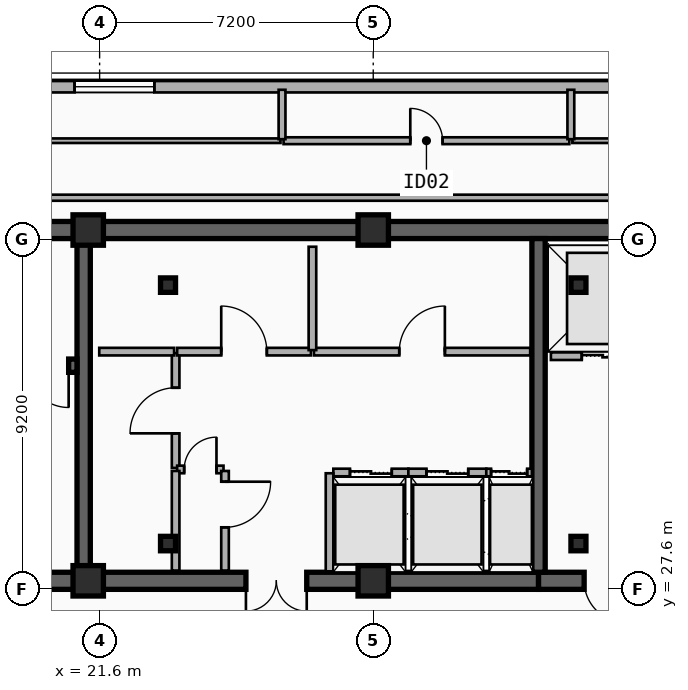
"""IFC4 building model, lengths in metres.
Left out: names, types, materials, properties, quantities, classifications, styles, units other than length and angle.
Written with IfcOpenShell. Run it as: python <this file> out.ifc"""

import sys

from ifc_helpers import new_model, si_unit, direction, frame, frame_2d, origin, origin_2d, place, context, subcontext, project, spatial, rectangle, i_section, extrude, element, fill, save


model = new_model("IFC4")
c1 = context("Model", 3, precision=1e-05, world=origin(), true_north=direction((0.0, 1.0)))
c2 = subcontext(c1, "Body", "Model", "MODEL_VIEW")
j1 = project(units=[si_unit("LENGTHUNIT", "METRE"), si_unit("PLANEANGLEUNIT", "RADIAN")], contexts=[c1])
p1 = place(None, origin())
s1 = spatial("IfcSite", under=j1, at=p1, CompositionType="ELEMENT")
p2 = place(p1, origin())
s2 = spatial("IfcBuilding", under=s1, at=p2, CompositionType="ELEMENT")
p3 = place(p2, frame((0.0, 0.0, 251.0)))
s3 = spatial("IfcBuildingStorey", under=s2, at=p3, CompositionType="ELEMENT", Elevation=251.0)
p4 = place(p3, frame((12.15, 37.05, 0.0), z_axis=(0.0, 0.0, 1.0), x_axis=(1.0, 0.0, 0.0)))
e1 = element("IfcWall", 1, at=p4, inside=s3, PredefinedType="SHEAR", context=c2, shape_type="SweptSolid", body=[
    extrude(rectangle(XDim=33.23, YDim=0.45, at=frame_2d((16.615, 0.0))), origin(), (0.0, 0.0, 1.0), 3.7),
])
p5 = place(p3, frame((21.18, 27.82, 0.0), z_axis=(0.0, 0.0, 1.0), x_axis=(-1.0, 0.0, 0.0)))
e2 = element("IfcWall", 2, at=p5, inside=s3, PredefinedType="SHEAR", context=c2, shape_type="SweptSolid", body=[
    extrude(rectangle(XDim=9.03, YDim=0.45, at=frame_2d((4.515, 0.0))), origin(), (0.0, 0.0, 1.0), 3.7),
])
p6 = place(p5, frame((2.68, 0.0, 0.0)))
e3 = element("IfcOpeningElement", 3, at=p6, cuts=e2, PredefinedType="OPENING", context=c2, shape_type="SweptSolid", body=[
    extrude(rectangle(XDim=1.1, YDim=2.15, at=frame_2d((0.55, 1.075))), frame((0.0, 0.235, 0.0), z_axis=(0.0, -1.0, 0.0), x_axis=(1.0, 0.0, 0.0)), (0.0, 0.0, 1.0), 0.47),
])
p7 = place(p3, frame((33.15, 27.82, 0.0), z_axis=(0.0, 0.0, 1.0), x_axis=(-1.0, 0.0, 0.0)))
e4 = element("IfcWall", 4, at=p7, inside=s3, PredefinedType="SHEAR", context=c2, shape_type="SweptSolid", body=[
    extrude(rectangle(XDim=11.97, YDim=0.45, at=frame_2d((5.985, 0.0))), origin(), (0.0, 0.0, 1.0), 3.7),
])
p8 = place(p7, frame((6.1, 0.0, 0.0)))
e5 = element("IfcOpeningElement", 5, at=p8, cuts=e4, PredefinedType="OPENING", context=c2, shape_type="SweptSolid", body=[
    extrude(rectangle(XDim=1.6, YDim=2.2, at=frame_2d((0.8, 1.1))), frame((0.0, 0.235, 0.0), z_axis=(0.0, -1.0, 0.0), x_axis=(1.0, 0.0, 0.0)), (0.0, 0.0, 1.0), 0.47),
])
p9 = place(p3, frame((45.38, 27.82, 0.0), z_axis=(0.0, 0.0, 1.0), x_axis=(-1.0, 0.0, 0.0)))
e6 = element("IfcWall", 6, at=p9, inside=s3, PredefinedType="SHEAR", context=c2, shape_type="SweptSolid", body=[
    extrude(rectangle(XDim=12.23, YDim=0.45, at=frame_2d((6.115, 0.0))), origin(), (0.0, 0.0, 1.0), 3.7),
])
p10 = place(p9, frame((9.93, 0.0, 0.0)))
e7 = element("IfcOpeningElement", 7, at=p10, cuts=e6, PredefinedType="OPENING", context=c2, shape_type="SweptSolid", body=[
    extrude(rectangle(XDim=1.1, YDim=2.15, at=frame_2d((0.55, 1.075))), frame((0.0, 0.235, 0.0), z_axis=(0.0, -1.0, 0.0), x_axis=(1.0, 0.0, 0.0)), (0.0, 0.0, 1.0), 0.47),
])
p11 = place(p9, frame((6.23, 0.0, 0.0)))
e8 = element("IfcOpeningElement", 8, at=p11, cuts=e6, PredefinedType="OPENING", context=c2, shape_type="SweptSolid", body=[
    extrude(rectangle(XDim=1.1, YDim=2.15, at=frame_2d((0.55, 1.075))), frame((0.0, 0.235, 0.0), z_axis=(0.0, -1.0, 0.0), x_axis=(1.0, 0.0, 0.0)), (0.0, 0.0, 1.0), 0.47),
])
for number, where, z_axis, x_axis in (
    (9, (21.18, 28.045, 0.0), (0.0, 0.0, 1.0), (0.0, 1.0, 0.0)),
    (10, (33.15, 28.045, 0.0), (0.0, 0.0, 1.0), (0.0, 1.0, 0.0)),
):
    element("IfcWall", number, at=place(p3, frame(where, z_axis=z_axis, x_axis=x_axis)), inside=s3, PredefinedType="SHEAR", context=c2, shape_type="SweptSolid", body=[
        extrude(rectangle(XDim=8.78, YDim=0.35, at=frame_2d((4.39, 0.0))), origin(), (0.0, 0.0, 1.0), 3.7),
    ])
p12 = place(p3, frame((21.005, 33.48, 0.0), z_axis=(0.0, 0.0, 1.0), x_axis=(-1.0, 0.0, 0.0)))
e11 = element("IfcWall", 11, at=p12, inside=s3, PredefinedType="SHEAR", context=c2, shape_type="SweptSolid", body=[
    extrude(rectangle(XDim=8.63, YDim=0.35, at=frame_2d((4.315, 0.0))), origin(), (0.0, 0.0, 1.0), 3.7),
])
p13 = place(p12, frame((0.22, 0.0, 0.0)))
e12 = element("IfcOpeningElement", 12, at=p13, cuts=e11, PredefinedType="OPENING", context=c2, shape_type="SweptSolid", body=[
    extrude(rectangle(XDim=1.1, YDim=2.15, at=frame_2d((0.55, 1.075))), frame((0.0, 0.185, 0.0), z_axis=(0.0, -1.0, 0.0), x_axis=(1.0, 0.0, 0.0)), (0.0, 0.0, 1.0), 0.37),
])
for number, where, z_axis, x_axis in (
    (13, (23.4, 28.8, 0.0), (0.0, 0.0, 1.0), (1.0, 0.0, 0.0)),
    (14, (34.2, 28.8, 0.0), (0.0, 0.0, 1.0), (1.0, 0.0, 0.0)),
    (15, (34.2, 35.6, 0.0), (0.0, 0.0, 1.0), (1.0, 0.0, 0.0)),
    (16, (23.4, 35.6, 0.0), (0.0, 0.0, 1.0), (1.0, 0.0, 0.0)),
):
    element("IfcColumn", number, at=place(p3, frame(where, z_axis=z_axis, x_axis=x_axis)), inside=s3, PredefinedType="COLUMN", context=c2, shape_type="SweptSolid", body=[
        extrude(i_section(OverallWidth=0.395, OverallDepth=0.38, WebThickness=0.019, FlangeThickness=0.03, FilletRadius=0.015, at=origin_2d()), origin(), (0.0, 0.0, 1.0), 3.7),
    ])
for number, where, z_axis, x_axis in (
    (17, (21.3, 27.82, 0.0), (0.0, 0.0, 1.0), (1.0, 0.0, 0.0)),
    (18, (21.3, 37.05, 0.0), (0.0, 0.0, 1.0), (1.0, 0.0, 0.0)),
    (19, (28.8, 27.82, 0.0), (0.0, 0.0, 1.0), (1.0, 0.0, 0.0)),
    (20, (28.8, 37.05, 0.0), (0.0, 0.0, 1.0), (1.0, 0.0, 0.0)),
):
    element("IfcColumn", number, at=place(p3, frame(where, z_axis=z_axis, x_axis=x_axis)), inside=s3, PredefinedType="COLUMN", context=c2, shape_type="SweptSolid", body=[
        extrude(rectangle(XDim=0.8, YDim=0.8, at=origin_2d()), origin(), (0.0, 0.0, 1.0), 3.7),
    ])
p14 = place(p3, frame((12.4, 40.82, 0.0), z_axis=(0.0, 0.0, 1.0), x_axis=(1.0, 0.0, 0.0)))
e21 = element("IfcWall", 21, at=p14, inside=s3, PredefinedType="SOLIDWALL", context=c2, shape_type="SweptSolid", body=[
    extrude(rectangle(XDim=32.8, YDim=0.3, at=frame_2d((16.4, 0.0))), origin(), (0.0, 0.0, 1.0), 3.42),
])
p15 = place(p14, frame((3.38, 0.0, 0.75)))
e22 = element("IfcOpeningElement", 22, at=p15, cuts=e21, PredefinedType="OPENING", context=c2, shape_type="SweptSolid", body=[
    extrude(rectangle(XDim=2.1, YDim=2.1, at=frame_2d((1.05, 1.05))), frame((0.0, 0.16, 0.0), z_axis=(0.0, -1.0, 0.0), x_axis=(1.0, 0.0, 0.0)), (0.0, 0.0, 1.0), 0.32),
])
p16 = place(p14, frame((8.54, 0.0, 0.75)))
e23 = element("IfcOpeningElement", 23, at=p16, cuts=e21, PredefinedType="OPENING", context=c2, shape_type="SweptSolid", body=[
    extrude(rectangle(XDim=2.1, YDim=2.1, at=frame_2d((1.05, 1.05))), frame((0.0, 0.16, 0.0), z_axis=(0.0, -1.0, 0.0), x_axis=(1.0, 0.0, 0.0)), (0.0, 0.0, 1.0), 0.32),
])
p17 = place(p3, frame((33.475, 33.73, 0.0), z_axis=(0.0, 0.0, 1.0), x_axis=(1.0, 0.0, 0.0)))
e24 = element("IfcWall", 24, at=p17, inside=s3, PredefinedType="PARTITIONING", context=c2, shape_type="SweptSolid", body=[
    extrude(rectangle(XDim=2.725, YDim=0.2, at=frame_2d((1.362, 0.0))), origin(), (0.0, 0.0, 1.0), 2.49),
])
p18 = place(p17, frame((0.812, 0.0, 0.0)))
e25 = element("IfcOpeningElement", 25, at=p18, cuts=e24, PredefinedType="OPENING", context=c2, shape_type="SweptSolid", body=[
    extrude(rectangle(XDim=1.1, YDim=2.15, at=frame_2d((0.55, 1.075))), frame((0.0, 0.11, 0.0), z_axis=(0.0, -1.0, 0.0), x_axis=(1.0, 0.0, 0.0)), (0.0, 0.0, 1.0), 0.22),
])
p19 = place(p3, frame((27.75, 30.67, 0.0), z_axis=(0.0, 0.0, 1.0), x_axis=(1.0, 0.0, 0.0)))
e26 = element("IfcWall", 26, at=p19, inside=s3, PredefinedType="PARTITIONING", context=c2, shape_type="SweptSolid", body=[
    extrude(rectangle(XDim=1.975, YDim=0.2, at=frame_2d((0.988, 0.0))), origin(), (0.0, 0.0, 1.0), 2.49),
])
p20 = place(p19, frame((0.438, 0.0, 0.0)))
e27 = element("IfcOpeningElement", 27, at=p20, cuts=e26, PredefinedType="OPENING", context=c2, shape_type="SweptSolid", body=[
    extrude(rectangle(XDim=1.1, YDim=2.15, at=frame_2d((0.55, 1.075))), frame((0.0, 0.11, 0.0), z_axis=(0.0, -1.0, 0.0), x_axis=(1.0, 0.0, 0.0)), (0.0, 0.0, 1.0), 0.22),
])
p21 = place(p3, frame((27.65, 28.07, 0.0), z_axis=(0.0, 0.0, 1.0), x_axis=(0.0, 1.0, 0.0)))
e28 = element("IfcWall", 28, at=p21, inside=s3, PredefinedType="PARTITIONING", context=c2, shape_type="SweptSolid", body=[
    extrude(rectangle(XDim=2.58, YDim=0.2, at=frame_2d((1.29, 0.0))), origin(), (0.0, 0.0, 1.0), 2.49),
])
p22 = place(p3, frame((29.725, 30.67, 0.0), z_axis=(0.0, 0.0, 1.0), x_axis=(1.0, 0.0, 0.0)))
e29 = element("IfcWall", 29, at=p22, inside=s3, PredefinedType="PARTITIONING", context=c2, shape_type="SweptSolid", body=[
    extrude(rectangle(XDim=2.05, YDim=0.2, at=frame_2d((1.025, 0.0))), origin(), (0.0, 0.0, 1.0), 2.8),
])
p23 = place(p22, frame((0.475, 0.0, 0.0)))
e30 = element("IfcOpeningElement", 30, at=p23, cuts=e29, PredefinedType="OPENING", context=c2, shape_type="SweptSolid", body=[
    extrude(rectangle(XDim=1.1, YDim=2.15, at=frame_2d((0.55, 1.075))), frame((0.0, 0.11, 0.0), z_axis=(0.0, -1.0, 0.0), x_axis=(1.0, 0.0, 0.0)), (0.0, 0.0, 1.0), 0.22),
])
p24 = place(p3, frame((31.775, 30.67, 0.0), z_axis=(0.0, 0.0, 1.0), x_axis=(1.0, 0.0, 0.0)))
e31 = element("IfcWall", 31, at=p24, inside=s3, PredefinedType="PARTITIONING", context=c2, shape_type="SweptSolid", body=[
    extrude(rectangle(XDim=1.2, YDim=0.2, at=frame_2d((0.6, 0.0))), origin(), (0.0, 0.0, 1.0), 2.8),
])
p25 = place(p24, frame((0.125, 0.0, 0.0)))
e32 = element("IfcOpeningElement", 32, at=p25, cuts=e31, PredefinedType="OPENING", context=c2, shape_type="SweptSolid", body=[
    extrude(rectangle(XDim=0.95, YDim=2.15, at=frame_2d((0.475, 1.075))), frame((0.0, 0.11, 0.0), z_axis=(0.0, -1.0, 0.0), x_axis=(1.0, 0.0, 0.0)), (0.0, 0.0, 1.0), 0.22),
])
p26 = place(p3, frame((23.6, 30.79, 0.0), z_axis=(0.0, 0.0, 1.0), x_axis=(0.0, 1.0, 0.0)))
e33 = element("IfcWall", 33, at=p26, inside=s3, PredefinedType="PARTITIONING", context=c2, shape_type="SweptSolid", body=[
    extrude(rectangle(XDim=3.02, YDim=0.2, at=frame_2d((1.51, 0.0))), origin(), (0.0, 0.0, 1.0), 3.42),
])
p27 = place(p26, frame((0.91, 0.0, 0.0)))
e34 = element("IfcOpeningElement", 34, at=p27, cuts=e33, PredefinedType="OPENING", context=c2, shape_type="SweptSolid", body=[
    extrude(rectangle(XDim=1.2, YDim=2.15, at=frame_2d((0.6, 1.075))), frame((0.0, 0.11, 0.0), z_axis=(0.0, -1.0, 0.0), x_axis=(1.0, 0.0, 0.0)), (0.0, 0.0, 1.0), 0.22),
])
p28 = place(p3, frame((23.64, 30.75, 0.0), z_axis=(0.0, 0.0, 1.0), x_axis=(1.0, 0.0, 0.0)))
e35 = element("IfcWall", 35, at=p28, inside=s3, PredefinedType="PARTITIONING", context=c2, shape_type="SweptSolid", body=[
    extrude(rectangle(XDim=1.22, YDim=0.2, at=frame_2d((0.61, 0.0))), origin(), (0.0, 0.0, 1.0), 3.42),
])
p29 = place(p28, frame((0.185, 0.0, 0.0)))
e36 = element("IfcOpeningElement", 36, at=p29, cuts=e35, PredefinedType="OPENING", context=c2, shape_type="SweptSolid", body=[
    extrude(rectangle(XDim=0.85, YDim=2.1, at=frame_2d((0.425, 1.05))), frame((0.0, 0.11, 0.0), z_axis=(0.0, -1.0, 0.0), x_axis=(1.0, 0.0, 0.0)), (0.0, 0.0, 1.0), 0.22),
])
p30 = place(p3, frame((23.64, 33.85, 0.0), z_axis=(0.0, 0.0, 1.0), x_axis=(1.0, 0.0, 0.0)))
e37 = element("IfcWall", 37, at=p30, inside=s3, PredefinedType="PARTITIONING", context=c2, shape_type="SweptSolid", body=[
    extrude(rectangle(XDim=3.52, YDim=0.2, at=frame_2d((1.76, 0.0))), origin(), (0.0, 0.0, 1.0), 3.42),
])
p31 = place(p30, frame((1.16, 0.0, 0.0)))
e38 = element("IfcOpeningElement", 38, at=p31, cuts=e37, PredefinedType="OPENING", context=c2, shape_type="SweptSolid", body=[
    extrude(rectangle(XDim=1.2, YDim=2.15, at=frame_2d((0.6, 1.075))), frame((0.0, 0.11, 0.0), z_axis=(0.0, -1.0, 0.0), x_axis=(1.0, 0.0, 0.0)), (0.0, 0.0, 1.0), 0.22),
])
p32 = place(p3, frame((27.24, 33.85, 0.0), z_axis=(0.0, 0.0, 1.0), x_axis=(1.0, 0.0, 0.0)))
e39 = element("IfcWall", 39, at=p32, inside=s3, PredefinedType="PARTITIONING", context=c2, shape_type="SweptSolid", body=[
    extrude(rectangle(XDim=5.69, YDim=0.2, at=frame_2d((2.845, 0.0))), origin(), (0.0, 0.0, 1.0), 2.49),
])
p33 = place(p32, frame((2.245, 0.0, 0.0)))
e40 = element("IfcOpeningElement", 40, at=p33, cuts=e39, PredefinedType="OPENING", context=c2, shape_type="SweptSolid", body=[
    extrude(rectangle(XDim=1.2, YDim=2.15, at=frame_2d((0.6, 1.075))), frame((0.0, 0.11, 0.0), z_axis=(0.0, -1.0, 0.0), x_axis=(1.0, 0.0, 0.0)), (0.0, 0.0, 1.0), 0.22),
])
p34 = place(p3, frame((24.9, 30.71, 0.0), z_axis=(0.0, 0.0, 1.0), x_axis=(0.0, -1.0, 0.0)))
e41 = element("IfcWall", 41, at=p34, inside=s3, PredefinedType="PARTITIONING", context=c2, shape_type="SweptSolid", body=[
    extrude(rectangle(XDim=2.62, YDim=0.2, at=frame_2d((1.31, 0.0))), origin(), (0.0, 0.0, 1.0), 2.8),
])
p35 = place(p34, frame((0.282, 0.0, 0.0)))
e42 = element("IfcOpeningElement", 42, at=p35, cuts=e41, PredefinedType="OPENING", context=c2, shape_type="SweptSolid", body=[
    extrude(rectangle(XDim=1.2, YDim=2.15, at=frame_2d((0.6, 1.075))), frame((0.0, 0.11, 0.0), z_axis=(0.0, -1.0, 0.0), x_axis=(1.0, 0.0, 0.0)), (0.0, 0.0, 1.0), 0.22),
])
p36 = place(p3, frame((23.6, 28.09, 0.0), z_axis=(0.0, 0.0, 1.0), x_axis=(0.0, 1.0, 0.0)))
e43 = element("IfcWall", 43, at=p36, inside=s3, PredefinedType="PARTITIONING", context=c2, shape_type="SweptSolid", body=[
    extrude(rectangle(XDim=2.62, YDim=0.2, at=frame_2d((1.31, 0.0))), origin(), (0.0, 0.0, 1.0), 2.8),
])
p37 = place(p3, frame((21.59, 33.85, 0.0), z_axis=(0.0, 0.0, 1.0), x_axis=(1.0, 0.0, 0.0)))
e44 = element("IfcWall", 44, at=p37, inside=s3, PredefinedType="PARTITIONING", context=c2, shape_type="SweptSolid", body=[
    extrude(rectangle(XDim=1.97, YDim=0.2, at=frame_2d((0.985, 0.0))), origin(), (0.0, 0.0, 1.0), 2.49),
])
p38 = place(p3, frame((27.2, 33.89, 0.0), z_axis=(0.0, 0.0, 1.0), x_axis=(0.0, 1.0, 0.0)))
e45 = element("IfcWall", 45, at=p38, inside=s3, PredefinedType="PARTITIONING", context=c2, shape_type="SweptSolid", body=[
    extrude(rectangle(XDim=2.72, YDim=0.2, at=frame_2d((1.36, 0.0))), origin(), (0.0, 0.0, 1.0), 3.42),
])
p39 = place(p3, frame((8.46, 39.4, 0.0), z_axis=(0.0, 0.0, 1.0), x_axis=(1.0, 0.0, 0.0)))
e46 = element("IfcWall", 46, at=p39, inside=s3, PredefinedType="PARTITIONING", context=c2, shape_type="SweptSolid", body=[
    extrude(rectangle(XDim=17.9, YDim=0.12, at=frame_2d((8.95, 0.0))), origin(), (0.0, 0.0, 1.0), 3.42),
])
p40 = place(p39, frame((8.5, 0.0, 0.0)))
e47 = element("IfcOpeningElement", 47, at=p40, cuts=e46, PredefinedType="OPENING", context=c2, shape_type="SweptSolid", body=[
    extrude(rectangle(XDim=0.9, YDim=2.1, at=frame_2d((0.45, 1.05))), frame((0.0, 0.07, 0.0), z_axis=(0.0, -1.0, 0.0), x_axis=(1.0, 0.0, 0.0)), (0.0, 0.0, 1.0), 0.14),
])
p41 = place(p3, frame((26.44, 39.4, 0.0), z_axis=(0.0, 0.0, 1.0), x_axis=(1.0, 0.0, 0.0)))
e48 = element("IfcWall", 48, at=p41, inside=s3, PredefinedType="PLUMBINGWALL", context=c2, shape_type="SweptSolid", body=[
    extrude(rectangle(XDim=7.52, YDim=0.18, at=frame_2d((3.76, 0.0))), origin(), (0.0, 0.0, 1.0), 3.42),
])
p42 = place(p41, frame((3.335, 0.0, 0.0)))
e49 = element("IfcOpeningElement", 49, at=p42, cuts=e48, PredefinedType="OPENING", context=c2, shape_type="SweptSolid", body=[
    extrude(rectangle(XDim=0.85, YDim=2.1, at=frame_2d((0.425, 1.05))), frame((0.0, 0.1, 0.0), z_axis=(0.0, -1.0, 0.0), x_axis=(1.0, 0.0, 0.0)), (0.0, 0.0, 1.0), 0.2),
])
p43 = place(p3, frame((34.04, 39.4, 0.0), z_axis=(0.0, 0.0, 1.0), x_axis=(1.0, 0.0, 0.0)))
e50 = element("IfcWall", 50, at=p43, inside=s3, PredefinedType="PARTITIONING", context=c2, shape_type="SweptSolid", body=[
    extrude(rectangle(XDim=15.1, YDim=0.12, at=frame_2d((7.55, 0.0))), origin(), (0.0, 0.0, 1.0), 3.42),
])
p44 = place(p43, frame((7.1, 0.0, 0.0)))
e51 = element("IfcOpeningElement", 51, at=p44, cuts=e50, PredefinedType="OPENING", context=c2, shape_type="SweptSolid", body=[
    extrude(rectangle(XDim=0.9, YDim=2.1, at=frame_2d((0.45, 1.05))), frame((0.0, 0.07, 0.0), z_axis=(0.0, -1.0, 0.0), x_axis=(1.0, 0.0, 0.0)), (0.0, 0.0, 1.0), 0.14),
])
for number, where, z_axis, x_axis in (
    (52, (26.4, 39.44, 0.0), (0.0, 0.0, 1.0), (0.0, 1.0, 0.0)),
    (53, (34.0, 39.44, 0.0), (0.0, 0.0, 1.0), (0.0, 1.0, 0.0)),
):
    element("IfcWall", number, at=place(p3, frame(where, z_axis=z_axis, x_axis=x_axis)), inside=s3, PredefinedType="PLUMBINGWALL", context=c2, shape_type="SweptSolid", body=[
        extrude(rectangle(XDim=1.3, YDim=0.18, at=frame_2d((0.65, 0.0))), origin(), (0.0, 0.0, 1.0), 3.42),
    ])
p45 = place(p3, frame((11.28, 37.9, 0.0), z_axis=(0.0, 0.0, 1.0), x_axis=(1.0, 0.0, 0.0)))
e54 = element("IfcWall", 54, at=p45, inside=s3, PredefinedType="PARTITIONING", context=c2, shape_type="SweptSolid", body=[
    extrude(rectangle(XDim=35.04, YDim=0.16, at=frame_2d((17.52, 0.0))), origin(), (0.0, 0.0, 1.0), 3.42),
])
p46 = place(p16, origin())
e55 = element("IfcWindow", 55, at=p46, inside=s3, PartitioningType="SINGLE_PANEL", PredefinedType="WINDOW", context=c2, shape_type="SweptSolid", body=[
    extrude(rectangle(XDim=2.1, YDim=2.1, at=frame_2d((1.05, 1.05))), frame((0.0, 0.03, 0.0), z_axis=(0.0, -1.0, 0.0), x_axis=(1.0, 0.0, 0.0)), (0.0, 0.0, 1.0), 0.06),
])
fill(e23, e55)
p47 = place(p18, origin())
e56 = element("IfcDoor", 56, at=p47, inside=s3, OperationType="DOUBLE_DOOR_SLIDING", PredefinedType="DOOR", context=c2, shape_type="SweptSolid", body=[
    extrude(rectangle(XDim=1.1, YDim=2.15, at=frame_2d((0.55, 1.075))), frame((0.0, 0.025, 0.0), z_axis=(0.0, -1.0, 0.0), x_axis=(1.0, 0.0, 0.0)), (0.0, 0.0, 1.0), 0.05),
])
fill(e25, e56)
p48 = place(p20, origin())
e57 = element("IfcDoor", 57, at=p48, inside=s3, OperationType="DOUBLE_DOOR_SLIDING", PredefinedType="DOOR", context=c2, shape_type="SweptSolid", body=[
    extrude(rectangle(XDim=1.1, YDim=2.15, at=frame_2d((0.55, 1.075))), frame((0.0, 0.025, 0.0), z_axis=(0.0, -1.0, 0.0), x_axis=(1.0, 0.0, 0.0)), (0.0, 0.0, 1.0), 0.05),
])
fill(e27, e57)
p49 = place(p23, origin())
e58 = element("IfcDoor", 58, at=p49, inside=s3, OperationType="DOUBLE_DOOR_SLIDING", PredefinedType="DOOR", context=c2, shape_type="SweptSolid", body=[
    extrude(rectangle(XDim=1.1, YDim=2.15, at=frame_2d((0.55, 1.075))), frame((0.0, 0.025, 0.0), z_axis=(0.0, -1.0, 0.0), x_axis=(1.0, 0.0, 0.0)), (0.0, 0.0, 1.0), 0.05),
])
fill(e30, e58)
p50 = place(p25, origin())
e59 = element("IfcDoor", 59, at=p50, inside=s3, OperationType="DOUBLE_DOOR_SLIDING", PredefinedType="DOOR", context=c2, shape_type="SweptSolid", body=[
    extrude(rectangle(XDim=0.95, YDim=2.15, at=frame_2d((0.475, 1.075))), frame((0.0, 0.025, 0.0), z_axis=(0.0, -1.0, 0.0), x_axis=(1.0, 0.0, 0.0)), (0.0, 0.0, 1.0), 0.05),
])
fill(e32, e59)
p51 = place(p13, origin())
e60 = element("IfcDoor", 60, at=p51, inside=s3, OperationType="SINGLE_SWING_LEFT", PredefinedType="DOOR", context=c2, shape_type="SweptSolid", body=[
    extrude(rectangle(XDim=1.1, YDim=2.15, at=frame_2d((0.55, 1.075))), frame((0.0, 0.025, 0.0), z_axis=(0.0, -1.0, 0.0), x_axis=(1.0, 0.0, 0.0)), (0.0, 0.0, 1.0), 0.05),
])
fill(e12, e60)
p52 = place(p10, origin())
e61 = element("IfcDoor", 61, at=p52, inside=s3, OperationType="SINGLE_SWING_LEFT", PredefinedType="DOOR", context=c2, shape_type="SweptSolid", body=[
    extrude(rectangle(XDim=1.1, YDim=2.15, at=frame_2d((0.55, 1.075))), frame((0.0, 0.025, 0.0), z_axis=(0.0, -1.0, 0.0), x_axis=(1.0, 0.0, 0.0)), (0.0, 0.0, 1.0), 0.05),
])
fill(e7, e61)
p53 = place(p8, origin())
e62 = element("IfcDoor", 62, at=p53, inside=s3, OperationType="SINGLE_SWING_LEFT", PredefinedType="DOOR", context=c2, shape_type="SweptSolid", body=[
    extrude(rectangle(XDim=1.6, YDim=2.2, at=frame_2d((0.8, 1.1))), frame((0.0, 0.025, 0.0), z_axis=(0.0, -1.0, 0.0), x_axis=(1.0, 0.0, 0.0)), (0.0, 0.0, 1.0), 0.05),
])
fill(e5, e62)
p54 = place(p27, origin())
e63 = element("IfcDoor", 63, at=p54, inside=s3, OperationType="SINGLE_SWING_LEFT", PredefinedType="DOOR", context=c2, shape_type="SweptSolid", body=[
    extrude(rectangle(XDim=1.2, YDim=2.15, at=frame_2d((0.6, 1.075))), frame((0.0, 0.025, 0.0), z_axis=(0.0, -1.0, 0.0), x_axis=(1.0, 0.0, 0.0)), (0.0, 0.0, 1.0), 0.05),
])
fill(e34, e63)
p55 = place(p29, origin())
e64 = element("IfcDoor", 64, at=p55, inside=s3, OperationType="SINGLE_SWING_RIGHT", PredefinedType="DOOR", context=c2, shape_type="SweptSolid", body=[
    extrude(rectangle(XDim=0.85, YDim=2.1, at=frame_2d((0.425, 1.05))), frame((0.0, 0.025, 0.0), z_axis=(0.0, -1.0, 0.0), x_axis=(1.0, 0.0, 0.0)), (0.0, 0.0, 1.0), 0.05),
])
fill(e36, e64)
p56 = place(p31, origin())
e65 = element("IfcDoor", 65, at=p56, inside=s3, OperationType="SINGLE_SWING_LEFT", PredefinedType="DOOR", context=c2, shape_type="SweptSolid", body=[
    extrude(rectangle(XDim=1.2, YDim=2.15, at=frame_2d((0.6, 1.075))), frame((0.0, 0.025, 0.0), z_axis=(0.0, -1.0, 0.0), x_axis=(1.0, 0.0, 0.0)), (0.0, 0.0, 1.0), 0.05),
])
fill(e38, e65)
p57 = place(p33, origin())
e66 = element("IfcDoor", 66, at=p57, inside=s3, OperationType="SINGLE_SWING_RIGHT", PredefinedType="DOOR", context=c2, shape_type="SweptSolid", body=[
    extrude(rectangle(XDim=1.2, YDim=2.15, at=frame_2d((0.6, 1.075))), frame((0.0, 0.025, 0.0), z_axis=(0.0, -1.0, 0.0), x_axis=(1.0, 0.0, 0.0)), (0.0, 0.0, 1.0), 0.05),
])
fill(e40, e66)
p58 = place(p35, origin())
e67 = element("IfcDoor", 67, at=p58, inside=s3, OperationType="SINGLE_SWING_LEFT", PredefinedType="DOOR", context=c2, shape_type="SweptSolid", body=[
    extrude(rectangle(XDim=1.2, YDim=2.15, at=frame_2d((0.6, 1.075))), frame((0.0, 0.025, 0.0), z_axis=(0.0, -1.0, 0.0), x_axis=(1.0, 0.0, 0.0)), (0.0, 0.0, 1.0), 0.05),
])
fill(e42, e67)
p59 = place(p42, origin())
e68 = element("IfcDoor", 68, at=p59, inside=s3, OperationType="SINGLE_SWING_LEFT", PredefinedType="DOOR", context=c2, shape_type="SweptSolid", body=[
    extrude(rectangle(XDim=0.85, YDim=2.1, at=frame_2d((0.425, 1.05))), frame((0.0, 0.025, 0.0), z_axis=(0.0, -1.0, 0.0), x_axis=(1.0, 0.0, 0.0)), (0.0, 0.0, 1.0), 0.05),
])
fill(e49, e68)
save(model, sys.argv[1])
